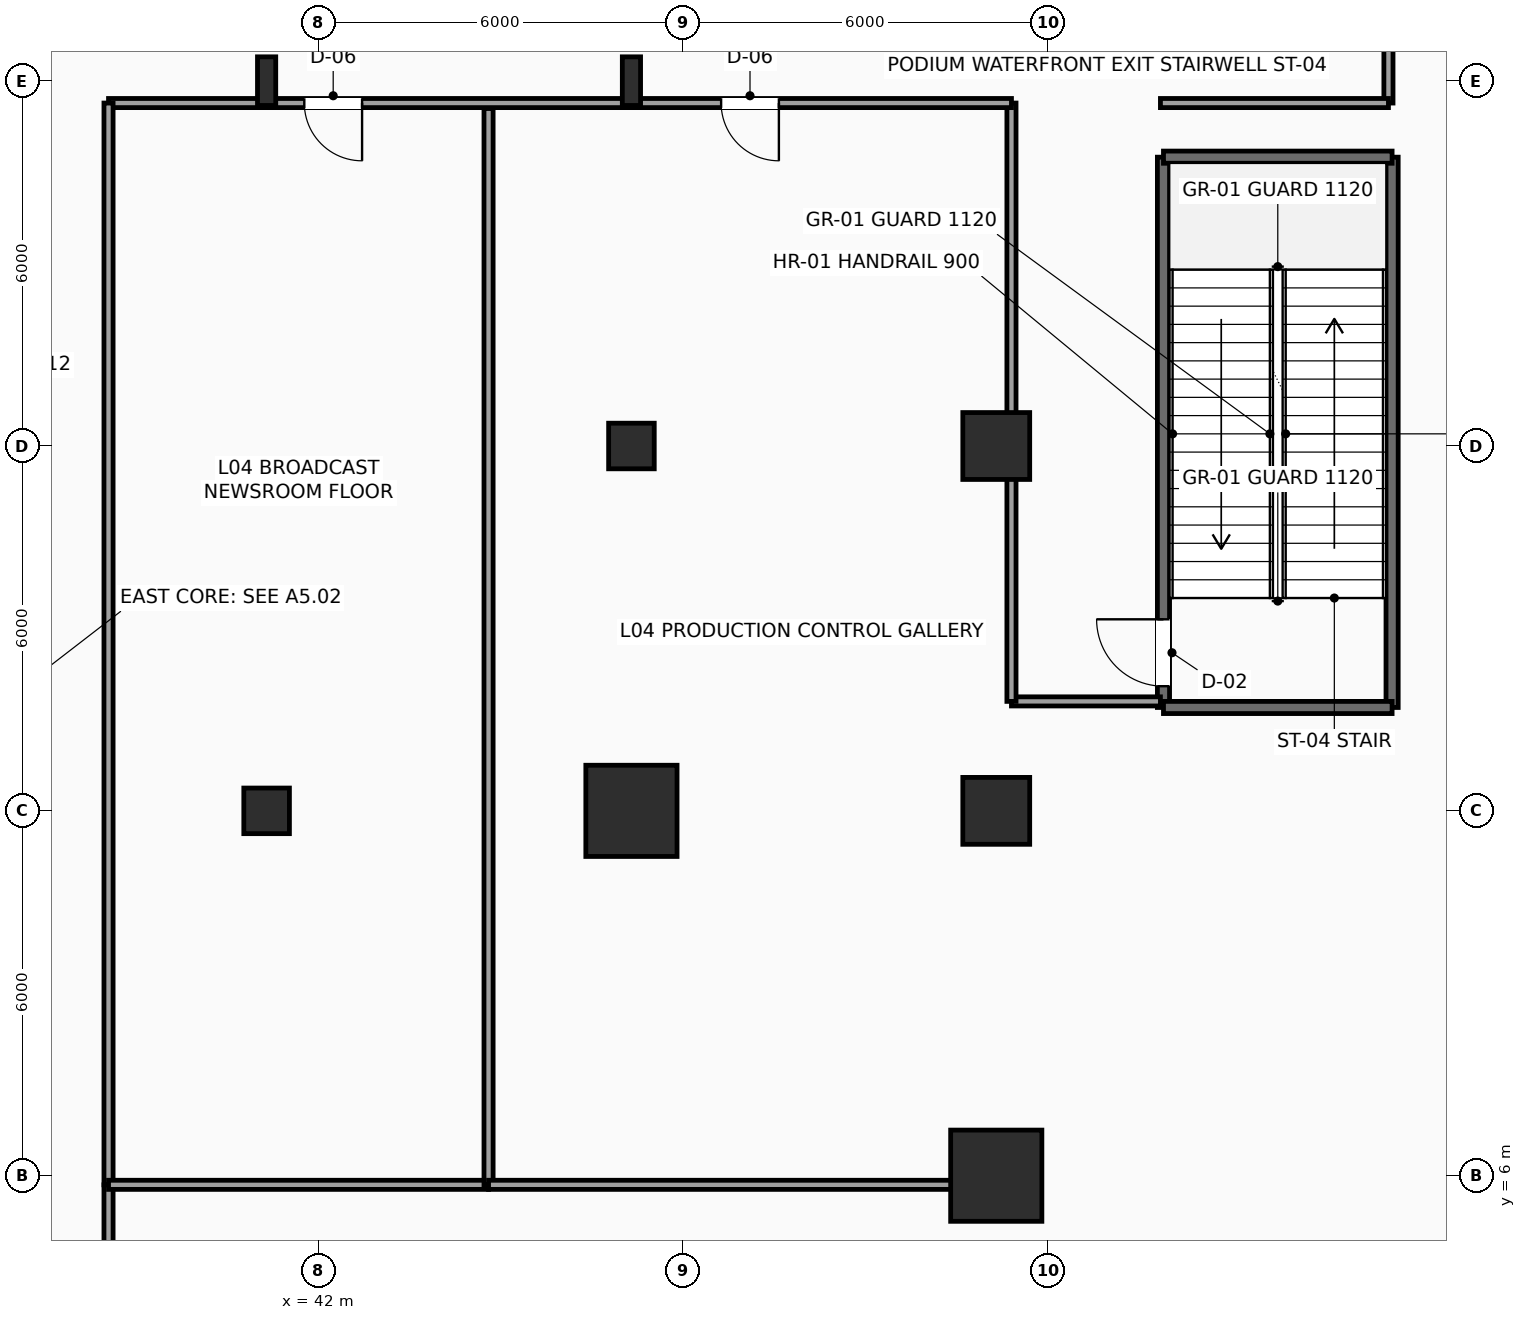
"""IFC4 building model, lengths in metres.
Left out: names, types, materials, properties, quantities, classifications, styles, units other than length and angle.
Written with IfcOpenShell. Run it as: python <this file> out.ifc"""

import sys

from ifc_helpers import new_model, si_unit, direction, frame, frame_2d, origin, origin_2d, place, context, subcontext, project, spatial, rectangle, hollow_rectangle, i_section, extrude, element, fill, save


model = new_model("IFC4")
c1 = context("Model", 3, precision=1e-05, world=origin(), true_north=direction((0.0, 1.0)))
c2 = subcontext(c1, "Body", "Model", "MODEL_VIEW")
j1 = project(units=[si_unit("LENGTHUNIT", "METRE"), si_unit("PLANEANGLEUNIT", "RADIAN")], contexts=[c1])
p1 = place(None, origin())
s1 = spatial("IfcSite", under=j1, at=p1, CompositionType="ELEMENT")
p2 = place(p1, origin())
s2 = spatial("IfcBuilding", under=s1, at=p2, CompositionType="ELEMENT")
p3 = place(p2, frame((0.0, 0.0, 21.9)))
s3 = spatial("IfcBuildingStorey", under=s2, at=p3, CompositionType="ELEMENT", Elevation=21.9)
p4 = place(p3, frame((41.15, 12.0, 0.0), z_axis=(0.0, 0.0, 1.0), x_axis=(1.0, 0.0, 0.0)))
e1 = element("IfcColumn", 1, at=p4, inside=s3, PredefinedType="COLUMN", context=c2, shape_type="SweptSolid", body=[
    extrude(hollow_rectangle(XDim=0.75, YDim=0.75, WallThickness=0.035, InnerFilletRadius=0.035, OuterFilletRadius=0.05, at=origin_2d()), origin(), (0.0, 0.0, 1.0), 5.35),
])
p5 = place(p3, frame((41.15, 24.0, 0.0), z_axis=(0.0, 0.0, 1.0), x_axis=(1.0, 0.0, 0.0)))
e2 = element("IfcColumn", 2, at=p5, inside=s3, PredefinedType="COLUMN", context=c2, shape_type="SweptSolid", body=[
    extrude(i_section(OverallWidth=0.3, OverallDepth=0.8, WebThickness=0.018, FlangeThickness=0.033, FilletRadius=0.03, at=origin_2d()), origin(), (0.0, 0.0, 1.0), 5.35),
])
p6 = place(p3, frame((47.15, 12.0, 0.0), z_axis=(0.0, 0.0, 1.0), x_axis=(1.0, 0.0, 0.0)))
e3 = element("IfcColumn", 3, at=p6, inside=s3, PredefinedType="COLUMN", context=c2, shape_type="SweptSolid", body=[
    extrude(rectangle(XDim=1.5, YDim=1.5, at=origin_2d()), origin(), (0.0, 0.0, 1.0), 5.35),
])
p7 = place(p3, frame((47.15, 18.0, 0.0), z_axis=(0.0, 0.0, 1.0), x_axis=(1.0, 0.0, 0.0)))
e4 = element("IfcColumn", 4, at=p7, inside=s3, PredefinedType="COLUMN", context=c2, shape_type="SweptSolid", body=[
    extrude(hollow_rectangle(XDim=0.75, YDim=0.75, WallThickness=0.035, InnerFilletRadius=0.035, OuterFilletRadius=0.05, at=origin_2d()), origin(), (0.0, 0.0, 1.0), 5.35),
])
p8 = place(p3, frame((47.15, 24.0, 0.0), z_axis=(0.0, 0.0, 1.0), x_axis=(1.0, 0.0, 0.0)))
e5 = element("IfcColumn", 5, at=p8, inside=s3, PredefinedType="COLUMN", context=c2, shape_type="SweptSolid", body=[
    extrude(i_section(OverallWidth=0.3, OverallDepth=0.8, WebThickness=0.018, FlangeThickness=0.033, FilletRadius=0.03, at=origin_2d()), origin(), (0.0, 0.0, 1.0), 5.35),
])
p9 = place(p3, frame((53.15, 6.0, 0.0), z_axis=(0.0, 0.0, 1.0), x_axis=(1.0, 0.0, 0.0)))
e6 = element("IfcColumn", 6, at=p9, inside=s3, PredefinedType="COLUMN", context=c2, shape_type="SweptSolid", body=[
    extrude(rectangle(XDim=1.5, YDim=1.5, at=origin_2d()), origin(), (0.0, 0.0, 1.0), 5.7),
])
for number, where, z_axis, x_axis in (
    (7, (53.15, 12.0, 0.0), (0.0, 0.0, 1.0), (1.0, 0.0, 0.0)),
    (8, (53.15, 18.0, 0.0), (0.0, 0.0, 1.0), (1.0, 0.0, 0.0)),
):
    element("IfcColumn", number, at=place(p3, frame(where, z_axis=z_axis, x_axis=x_axis)), inside=s3, PredefinedType="COLUMN", context=c2, shape_type="SweptSolid", body=[
        extrude(rectangle(XDim=1.1, YDim=1.1, at=origin_2d()), origin(), (0.0, 0.0, 1.0), 5.35),
    ])
p10 = place(p3, frame((55.9, 13.7, 0.0), z_axis=(0.0, 0.0, 1.0), x_axis=(0.0, 1.0, 0.0)))
e9 = element("IfcWall", 9, at=p10, inside=s3, PredefinedType="SHEAR", context=c2, shape_type="SweptSolid", body=[
    extrude(rectangle(XDim=9.05, YDim=0.2, at=frame_2d((4.525, 0.0))), origin(), (0.0, 0.0, 1.0), 5.35),
])
p11 = place(p10, frame((0.35, 0.0, 0.0)))
e10 = element("IfcOpeningElement", 10, at=p11, cuts=e9, PredefinedType="OPENING", context=c2, shape_type="SweptSolid", body=[
    extrude(rectangle(XDim=1.1, YDim=2.2, at=frame_2d((0.55, 1.1))), frame((0.0, 0.11, 0.0), z_axis=(0.0, -1.0, 0.0), x_axis=(1.0, 0.0, 0.0)), (0.0, 0.0, 1.0), 0.22),
])
p12 = place(p3, frame((59.66, 13.7, 0.0), z_axis=(0.0, 0.0, 1.0), x_axis=(0.0, 1.0, 0.0)))
e11 = element("IfcWall", 11, at=p12, inside=s3, PredefinedType="SHEAR", context=c2, shape_type="SweptSolid", body=[
    extrude(rectangle(XDim=9.05, YDim=0.2, at=frame_2d((4.525, 0.0))), origin(), (0.0, 0.0, 1.0), 5.35),
])
for number, where, z_axis, x_axis in (
    (12, (55.9, 13.7, 0.0), (0.0, 0.0, 1.0), (1.0, 0.0, 0.0)),
    (13, (55.9, 22.75, 0.0), (0.0, 0.0, 1.0), (1.0, 0.0, 0.0)),
):
    element("IfcWall", number, at=place(p3, frame(where, z_axis=z_axis, x_axis=x_axis)), inside=s3, PredefinedType="SHEAR", context=c2, shape_type="SweptSolid", body=[
        extrude(rectangle(XDim=3.76, YDim=0.2, at=frame_2d((1.88, 0.0))), origin(), (0.0, 0.0, 1.0), 5.35),
    ])
p13 = place(p3, frame((59.6, 26.2, 0.0), z_axis=(0.0, 0.0, 1.0), x_axis=(0.0, -1.0, 0.0)))
e14 = element("IfcWall", 14, at=p13, inside=s3, PredefinedType="PARTITIONING", context=c2, shape_type="SweptSolid", body=[
    extrude(rectangle(XDim=2.56, YDim=0.15, at=frame_2d((1.28, 0.0))), origin(), (0.0, 0.0, 1.0), 5.35),
])
p14 = place(p3, frame((59.6, 23.64, 0.0), z_axis=(0.0, 0.0, 1.0), x_axis=(-1.0, 0.0, 0.0)))
e15 = element("IfcWall", 15, at=p14, inside=s3, PredefinedType="PARTITIONING", context=c2, shape_type="SweptSolid", body=[
    extrude(rectangle(XDim=3.75, YDim=0.15, at=frame_2d((1.875, 0.0))), origin(), (0.0, 0.0, 1.0), 5.35),
])
p15 = place(p3, frame((55.85, 13.8, 0.0), z_axis=(0.0, 0.0, 1.0), x_axis=(-1.0, 0.0, 0.0)))
e16 = element("IfcWall", 16, at=p15, inside=s3, PredefinedType="PARTITIONING", context=c2, shape_type="SweptSolid", body=[
    extrude(rectangle(XDim=2.45, YDim=0.15, at=frame_2d((1.225, 0.0))), origin(), (0.0, 0.0, 1.0), 5.35),
])
p16 = place(p3, frame((53.4, 13.8, 0.0), z_axis=(0.0, 0.0, 1.0), x_axis=(0.0, 1.0, 0.0)))
e17 = element("IfcWall", 17, at=p16, inside=s3, PredefinedType="PARTITIONING", context=c2, shape_type="SweptSolid", body=[
    extrude(rectangle(XDim=9.84, YDim=0.15, at=frame_2d((4.92, 0.0))), origin(), (0.0, 0.0, 1.0), 5.35),
])
p17 = place(p3, frame((53.4, 23.64, 0.0), z_axis=(0.0, 0.0, 1.0), x_axis=(-1.0, 0.0, 0.0)))
e18 = element("IfcWall", 18, at=p17, inside=s3, PredefinedType="PARTITIONING", context=c2, shape_type="SweptSolid", body=[
    extrude(rectangle(XDim=14.85, YDim=0.15, at=frame_2d((7.425, 0.0))), origin(), (0.0, 0.0, 1.0), 5.35),
])
p18 = place(p17, frame((10.68, 0.0, 0.0)))
e19 = element("IfcOpeningElement", 19, at=p18, cuts=e18, PredefinedType="OPENING", context=c2, shape_type="SweptSolid", body=[
    extrude(rectangle(XDim=0.95, YDim=2.15, at=frame_2d((0.475, 1.075))), frame((0.0, 0.085, 0.0), z_axis=(0.0, -1.0, 0.0), x_axis=(1.0, 0.0, 0.0)), (0.0, 0.0, 1.0), 0.17),
])
p19 = place(p17, frame((3.825, 0.0, 0.0)))
e20 = element("IfcOpeningElement", 20, at=p19, cuts=e18, PredefinedType="OPENING", context=c2, shape_type="SweptSolid", body=[
    extrude(rectangle(XDim=0.95, YDim=2.15, at=frame_2d((0.475, 1.075))), frame((0.0, 0.085, 0.0), z_axis=(0.0, -1.0, 0.0), x_axis=(1.0, 0.0, 0.0)), (0.0, 0.0, 1.0), 0.17),
])
p20 = place(p3, frame((38.55, 23.64, 0.0), z_axis=(0.0, 0.0, 1.0), x_axis=(0.0, -1.0, 0.0)))
e21 = element("IfcWall", 21, at=p20, inside=s3, PredefinedType="PARTITIONING", context=c2, shape_type="SweptSolid", body=[
    extrude(rectangle(XDim=17.79, YDim=0.15, at=frame_2d((8.895, 0.0))), origin(), (0.0, 0.0, 1.0), 5.35),
])
p21 = place(p3, frame((38.55, 5.85, 0.0), z_axis=(0.0, 0.0, 1.0), x_axis=(0.0, -1.0, 0.0)))
e22 = element("IfcWall", 22, at=p21, inside=s3, PredefinedType="PARTITIONING", context=c2, shape_type="SweptSolid", body=[
    extrude(rectangle(XDim=2.4, YDim=0.15, at=frame_2d((1.2, 0.0))), origin(), (0.0, 0.0, 1.0), 5.35),
])
p22 = place(p3, frame((38.55, 5.85, 0.0), z_axis=(0.0, 0.0, 1.0), x_axis=(1.0, 0.0, 0.0)))
e23 = element("IfcWall", 23, at=p22, inside=s3, PredefinedType="PARTITIONING", context=c2, shape_type="SweptSolid", body=[
    extrude(rectangle(XDim=6.25, YDim=0.15, at=frame_2d((3.125, 0.0))), origin(), (0.0, 0.0, 1.0), 4.442),
])
p23 = place(p3, frame((44.8, 5.85, 0.0), z_axis=(0.0, 0.0, 1.0), x_axis=(0.0, 1.0, 0.0)))
e24 = element("IfcWall", 24, at=p23, inside=s3, PredefinedType="PARTITIONING", context=c2, shape_type="SweptSolid", body=[
    extrude(rectangle(XDim=17.7, YDim=0.15, at=frame_2d((8.85, 0.0))), origin(), (0.0, 0.0, 1.0), 5.35),
])
p24 = place(p3, frame((44.8, 5.85, 0.0), z_axis=(0.0, 0.0, 1.0), x_axis=(1.0, 0.0, 0.0)))
e25 = element("IfcWall", 25, at=p24, inside=s3, PredefinedType="PARTITIONING", context=c2, shape_type="SweptSolid", body=[
    extrude(rectangle(XDim=8.6, YDim=0.15, at=frame_2d((4.3, 0.0))), origin(), (0.0, 0.0, 1.0), 4.442),
])
p25 = place(p11, origin())
e26 = element("IfcDoor", 26, at=p25, inside=s3, OperationType="SINGLE_SWING_RIGHT", PredefinedType="DOOR", context=c2, shape_type="SweptSolid", body=[
    extrude(rectangle(XDim=1.1, YDim=2.2, at=frame_2d((0.55, 1.1))), frame((0.0, 0.025, 0.0), z_axis=(0.0, -1.0, 0.0), x_axis=(1.0, 0.0, 0.0)), (0.0, 0.0, 1.0), 0.05),
])
fill(e10, e26)
p26 = place(p18, origin())
e27 = element("IfcDoor", 27, at=p26, inside=s3, OperationType="SINGLE_SWING_LEFT", PredefinedType="DOOR", context=c2, shape_type="SweptSolid", body=[
    extrude(rectangle(XDim=0.95, YDim=2.15, at=frame_2d((0.475, 1.075))), frame((0.0, 0.025, 0.0), z_axis=(0.0, -1.0, 0.0), x_axis=(1.0, 0.0, 0.0)), (0.0, 0.0, 1.0), 0.05),
])
fill(e19, e27)
p27 = place(p19, origin())
e28 = element("IfcDoor", 28, at=p27, inside=s3, OperationType="SINGLE_SWING_LEFT", PredefinedType="DOOR", context=c2, shape_type="SweptSolid", body=[
    extrude(rectangle(XDim=0.95, YDim=2.15, at=frame_2d((0.475, 1.075))), frame((0.0, 0.025, 0.0), z_axis=(0.0, -1.0, 0.0), x_axis=(1.0, 0.0, 0.0)), (0.0, 0.0, 1.0), 0.05),
])
fill(e20, e28)
save(model, sys.argv[1])
